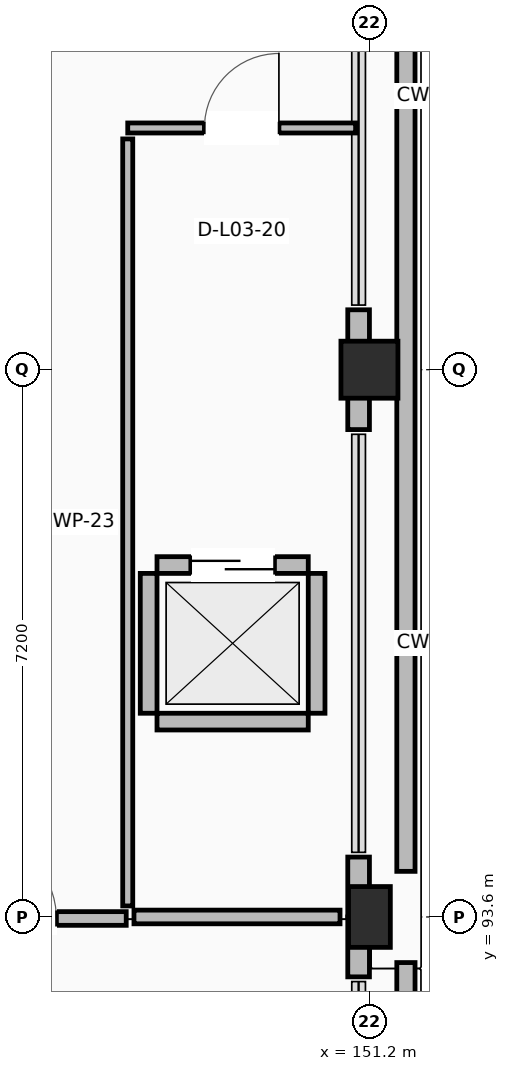
"""IFC4 building model, lengths in metres.
Left out: names, types, materials, properties, quantities, classifications, styles, units other than length and angle.
Written with IfcOpenShell. Run it as: python <this file> out.ifc"""

import sys

from ifc_helpers import new_model, si_unit, direction, frame, frame_2d, origin, origin_2d, place, context, subcontext, project, spatial, rectangle, extrude, element, fill, save


model = new_model("IFC4")
c1 = context("Model", 3, precision=1e-05, world=origin(), true_north=direction((0.0, 1.0)))
c2 = subcontext(c1, "Body", "Model", "MODEL_VIEW")
j1 = project(units=[si_unit("LENGTHUNIT", "METRE"), si_unit("PLANEANGLEUNIT", "RADIAN")], contexts=[c1])
p1 = place(None, origin())
s1 = spatial("IfcSite", under=j1, at=p1, CompositionType="ELEMENT")
p2 = place(p1, origin())
s2 = spatial("IfcBuilding", under=s1, at=p2, CompositionType="ELEMENT")
p3 = place(p2, frame((0.0, 0.0, 13.5)))
s3 = spatial("IfcBuildingStorey", under=s2, at=p3, CompositionType="ELEMENT", Elevation=13.5)
p4 = place(p3, frame((151.2, 93.6, 0.0), z_axis=(0.0, 0.0, 1.0), x_axis=(1.0, 0.0, 0.0)))
e1 = element("IfcColumn", 1, at=p4, inside=s3, PredefinedType="COLUMN", context=c2, shape_type="SweptSolid", body=[
    extrude(rectangle(XDim=0.55, YDim=0.8, at=origin_2d()), origin(), (0.0, 0.0, 1.0), 4.22),
])
p5 = place(p3, frame((151.2, 100.8, 0.0), z_axis=(0.0, 0.0, 1.0), x_axis=(1.0, 0.0, 0.0)))
e2 = element("IfcColumn", 2, at=p5, inside=s3, PredefinedType="COLUMN", context=c2, shape_type="SweptSolid", body=[
    extrude(rectangle(XDim=0.75, YDim=0.75, at=origin_2d()), origin(), (0.0, 0.0, 1.0), 4.22),
])
p6 = place(p3, frame((151.058, 92.812, 0.0), z_axis=(0.0, 0.0, 1.0), x_axis=(0.0, 1.0, 0.0)))
e3 = element("IfcWall", 3, at=p6, inside=s3, PredefinedType="STANDARD", context=c2, shape_type="SweptSolid", body=[
    extrude(rectangle(XDim=0.788, YDim=0.285, at=frame_2d((0.394, 0.0))), origin(), (0.0, 0.0, 1.0), 3.26),
])
p7 = place(p3, frame((151.058, 93.6, 0.0), z_axis=(0.0, 0.0, 1.0), x_axis=(0.0, 1.0, 0.0)))
e4 = element("IfcWall", 4, at=p7, inside=s3, PredefinedType="STANDARD", context=c2, shape_type="SweptSolid", body=[
    extrude(rectangle(XDim=0.788, YDim=0.285, at=frame_2d((0.394, 0.0))), origin(), (0.0, 0.0, 1.0), 3.26),
])
p8 = place(p3, frame((151.058, 100.012, 0.0), z_axis=(0.0, 0.0, 1.0), x_axis=(0.0, 1.0, 0.0)))
e5 = element("IfcWall", 5, at=p8, inside=s3, PredefinedType="STANDARD", context=c2, shape_type="SweptSolid", body=[
    extrude(rectangle(XDim=1.576, YDim=0.285, at=frame_2d((0.788, 0.0))), origin(), (0.0, 0.0, 1.0), 3.26),
])
p9 = place(p3, frame((151.68, 115.56, 0.0), z_axis=(0.0, 0.0, 1.0), x_axis=(0.0, -1.0, 0.0)))
e6 = element("IfcWall", 6, at=p9, inside=s3, PredefinedType="PARAPET", context=c2, shape_type="SweptSolid", body=[
    extrude(rectangle(XDim=21.36, YDim=0.24, at=frame_2d((10.68, 0.0))), origin(), (0.0, 0.0, 1.0), 1.12),
])
p10 = place(p3, frame((151.68, 93.0, 0.0), z_axis=(0.0, 0.0, 1.0), x_axis=(0.0, -1.0, 0.0)))
e7 = element("IfcWall", 7, at=p10, inside=s3, PredefinedType="PARAPET", context=c2, shape_type="SweptSolid", body=[
    extrude(rectangle(XDim=6.96, YDim=0.24, at=frame_2d((3.48, 0.0))), origin(), (0.0, 0.0, 1.0), 1.12),
])
p11 = place(p3, frame((148.405, 96.17, 0.0), z_axis=(0.0, 0.0, 1.0), x_axis=(1.0, 0.0, 0.0)))
e8 = element("IfcWall", 8, at=p11, inside=s3, PredefinedType="STANDARD", context=c2, shape_type="SweptSolid", body=[
    extrude(rectangle(XDim=1.99, YDim=0.22, at=frame_2d((0.995, 0.0))), origin(), (0.0, 0.0, 1.0), 3.26),
])
p12 = place(p3, frame((148.405, 98.23, 0.0), z_axis=(0.0, 0.0, 1.0), x_axis=(1.0, 0.0, 0.0)))
e9 = element("IfcWall", 9, at=p12, inside=s3, PredefinedType="STANDARD", context=c2, shape_type="SweptSolid", body=[
    extrude(rectangle(XDim=1.99, YDim=0.22, at=frame_2d((0.995, 0.0))), origin(), (0.0, 0.0, 1.0), 3.26),
])
p13 = place(p12, frame((0.445, 0.0, 0.0)))
e10 = element("IfcOpeningElement", 10, at=p13, cuts=e9, PredefinedType="OPENING", context=c2, shape_type="SweptSolid", body=[
    extrude(rectangle(XDim=1.1, YDim=2.15, at=frame_2d((0.55, 1.075))), frame((0.0, 0.12, 0.0), z_axis=(0.0, -1.0, 0.0), x_axis=(1.0, 0.0, 0.0)), (0.0, 0.0, 1.0), 0.24),
])
for number, where, z_axis, x_axis in (
    (11, (148.295, 96.28, 0.0), (0.0, 0.0, 1.0), (0.0, 1.0, 0.0)),
    (12, (150.505, 96.28, 0.0), (0.0, 0.0, 1.0), (0.0, 1.0, 0.0)),
):
    element("IfcWall", number, at=place(p3, frame(where, z_axis=z_axis, x_axis=x_axis)), inside=s3, PredefinedType="STANDARD", context=c2, shape_type="SweptSolid", body=[
        extrude(rectangle(XDim=1.84, YDim=0.22, at=frame_2d((0.92, 0.0))), origin(), (0.0, 0.0, 1.0), 3.26),
    ])
p14 = place(p3, frame((145.082, 93.58, 0.0), z_axis=(0.0, 0.0, 1.0), x_axis=(1.0, 0.0, 0.0)))
e13 = element("IfcWall", 13, at=p14, inside=s3, PredefinedType="PARTITIONING", context=c2, shape_type="SweptSolid", body=[
    extrude(rectangle(XDim=2.918, YDim=0.18, at=frame_2d((1.459, 0.0))), origin(), (0.0, 0.0, 1.0), 3.26),
])
p15 = place(p14, frame((0.919, 0.0, 0.0)))
e14 = element("IfcOpeningElement", 14, at=p15, cuts=e13, PredefinedType="OPENING", context=c2, shape_type="SweptSolid", body=[
    extrude(rectangle(XDim=1.08, YDim=2.15, at=frame_2d((0.54, 1.075))), frame((0.0, 0.1, 0.0), z_axis=(0.0, -1.0, 0.0), x_axis=(1.0, 0.0, 0.0)), (0.0, 0.0, 1.0), 0.2),
])
p16 = place(p3, frame((148.102, 93.6, 0.0), z_axis=(0.0, 0.0, 1.0), x_axis=(1.0, 0.0, 0.0)))
e15 = element("IfcWall", 15, at=p16, inside=s3, PredefinedType="PARTITIONING", context=c2, shape_type="SweptSolid", body=[
    extrude(rectangle(XDim=2.711, YDim=0.18, at=frame_2d((1.355, 0.0))), origin(), (0.0, 0.0, 1.0), 3.26),
])
p17 = place(p3, frame((148.02, 103.98, 0.0), z_axis=(0.0, 0.0, 1.0), x_axis=(1.0, 0.0, 0.0)))
e16 = element("IfcWall", 16, at=p17, inside=s3, PredefinedType="PARTITIONING", context=c2, shape_type="SweptSolid", body=[
    extrude(rectangle(XDim=2.998, YDim=0.132, at=frame_2d((1.499, 0.0))), origin(), (0.0, 0.0, 1.0), 3.26),
])
p18 = place(p17, frame((1.009, 0.0, 0.0)))
e17 = element("IfcOpeningElement", 17, at=p18, cuts=e16, PredefinedType="OPENING", context=c2, shape_type="SweptSolid", body=[
    extrude(rectangle(XDim=0.98, YDim=2.1, at=frame_2d((0.49, 1.05))), frame((0.0, 0.076, 0.0), z_axis=(0.0, -1.0, 0.0), x_axis=(1.0, 0.0, 0.0)), (0.0, 0.0, 1.0), 0.152),
])
p19 = place(p3, frame((148.02, 93.745, 0.0), z_axis=(0.0, 0.0, 1.0), x_axis=(0.0, 1.0, 0.0)))
e18 = element("IfcWall", 18, at=p19, inside=s3, PredefinedType="PARTITIONING", context=c2, shape_type="SweptSolid", body=[
    extrude(rectangle(XDim=10.091, YDim=0.132, at=frame_2d((5.045, 0.0))), origin(), (0.0, 0.0, 1.0), 3.26),
])
p20 = place(p13, origin())
e19 = element("IfcDoor", 19, at=p20, inside=s3, OperationType="SLIDING_TO_RIGHT", PredefinedType="DOOR", context=c2, shape_type="SweptSolid", body=[
    extrude(rectangle(XDim=1.1, YDim=2.15, at=frame_2d((0.55, 1.075))), frame((0.0, 0.025, 0.0), z_axis=(0.0, -1.0, 0.0), x_axis=(1.0, 0.0, 0.0)), (0.0, 0.0, 1.0), 0.05),
])
fill(e10, e19)
p21 = place(p15, origin())
e20 = element("IfcDoor", 20, at=p21, inside=s3, OperationType="SINGLE_SWING_LEFT", PredefinedType="DOOR", context=c2, shape_type="SweptSolid", body=[
    extrude(rectangle(XDim=1.08, YDim=2.15, at=frame_2d((0.54, 1.075))), frame((0.0, 0.025, 0.0), z_axis=(0.0, -1.0, 0.0), x_axis=(1.0, 0.0, 0.0)), (0.0, 0.0, 1.0), 0.05),
])
fill(e14, e20)
p22 = place(p18, origin())
e21 = element("IfcDoor", 21, at=p22, inside=s3, OperationType="SINGLE_SWING_RIGHT", PredefinedType="DOOR", context=c2, shape_type="SweptSolid", body=[
    extrude(rectangle(XDim=0.98, YDim=2.1, at=frame_2d((0.49, 1.05))), frame((0.0, 0.025, 0.0), z_axis=(0.0, -1.0, 0.0), x_axis=(1.0, 0.0, 0.0)), (0.0, 0.0, 1.0), 0.05),
])
fill(e17, e21)
save(model, sys.argv[1])
